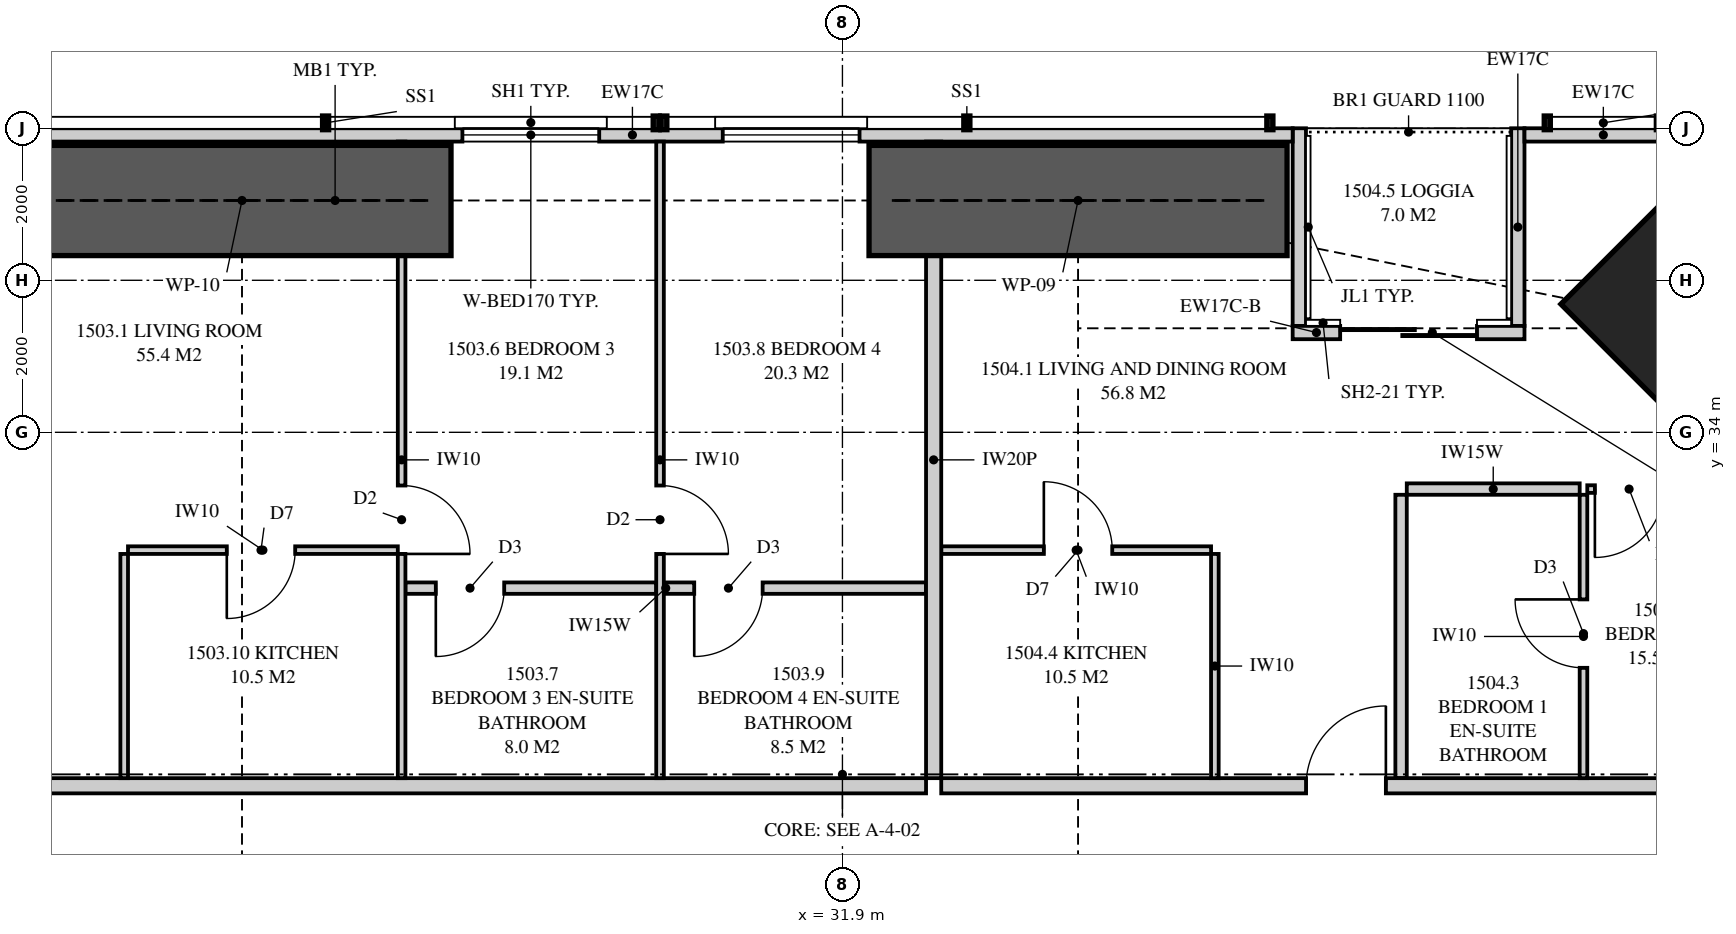
"""IFC4 building model, lengths in metres.
Left out: names, types, materials, properties, quantities, classifications, styles, units other than length and angle.
Written with IfcOpenShell. Run it as: python <this file> out.ifc"""

import sys

from ifc_helpers import new_model, si_unit, direction, frame, frame_2d, origin, origin_2d, place, context, subcontext, project, spatial, polyline, rectangle, outline, extrude, element, fill, save


model = new_model("IFC4")
c1 = context("Model", 3, precision=1e-05, world=origin(), true_north=direction((0.0, 1.0)))
c2 = subcontext(c1, "Body", "Model", "MODEL_VIEW")
j1 = project(units=[si_unit("LENGTHUNIT", "METRE"), si_unit("PLANEANGLEUNIT", "RADIAN")], contexts=[c1])
p1 = place(None, origin())
s1 = spatial("IfcSite", under=j1, at=p1, CompositionType="ELEMENT")
p2 = place(p1, origin())
s2 = spatial("IfcBuilding", under=s1, at=p2, CompositionType="ELEMENT")
p3 = place(p2, frame((0.0, 0.0, 57.85)))
s3 = spatial("IfcBuildingStorey", under=s2, at=p3, CompositionType="ELEMENT", Elevation=57.85)
p4 = place(p3, frame((43.369, 35.369, 0.0), z_axis=(0.0, 0.0, 1.0), x_axis=(-0.707106781187, -0.707106781187, 0.0)))
e1 = element("IfcColumn", 1, at=p4, inside=s3, PredefinedType="COLUMN", context=c2, shape_type="SweptSolid", body=[
    extrude(rectangle(XDim=2.4, YDim=3.3, at=origin_2d()), origin(), (0.0, 0.0, 1.0), 3.35),
])
p5 = place(p3, frame((42.949, 37.913, 0.0), z_axis=(0.0, 0.0, 1.0), x_axis=(-1.0, 0.0, 0.0)))
e2 = element("IfcWall", 2, at=p5, inside=s3, PredefinedType="SOLIDWALL", context=c2, shape_type="SweptSolid", body=[
    extrude(rectangle(XDim=2.075, YDim=0.175, at=frame_2d((1.038, 0.0))), origin(), (0.0, 0.0, 1.0), 3.11),
])
p6 = place(p3, frame((37.824, 37.913, 0.0), z_axis=(0.0, 0.0, 1.0), x_axis=(-1.0, 0.0, 0.0)))
e3 = element("IfcWall", 3, at=p6, inside=s3, PredefinedType="SOLIDWALL", context=c2, shape_type="SweptSolid", body=[
    extrude(outline(polyline([(0.0, 0.0), (17.374, 0.0), (17.374, 2.15), (2.824, 2.15), (2.824, 3.11), (2.668, 3.11), (2.668, 2.15), (2.62, 2.15), (2.62, 3.11), (0.0, 3.11), (0.0, 0.0)])), frame((0.0, 0.087, 0.0), z_axis=(0.0, -1.0, 0.0), x_axis=(1.0, 0.0, 0.0)), (0.0, 0.0, 1.0), 0.175),
])
p7 = place(p6, frame((5.699, 0.0, 0.4)))
e4 = element("IfcOpeningElement", 4, at=p7, cuts=e3, PredefinedType="OPENING", context=c2, shape_type="SweptSolid", body=[
    extrude(rectangle(XDim=1.8, YDim=1.7, at=frame_2d((0.9, 0.85))), frame((0.0, 0.097, 0.0), z_axis=(0.0, -1.0, 0.0), x_axis=(1.0, 0.0, 0.0)), (0.0, 0.0, 1.0), 0.195),
])
p8 = place(p6, frame((9.124, 0.0, 0.4)))
e5 = element("IfcOpeningElement", 5, at=p8, cuts=e3, PredefinedType="OPENING", context=c2, shape_type="SweptSolid", body=[
    extrude(rectangle(XDim=1.8, YDim=1.7, at=frame_2d((0.9, 0.85))), frame((0.0, 0.097, 0.0), z_axis=(0.0, -1.0, 0.0), x_axis=(1.0, 0.0, 0.0)), (0.0, 0.0, 1.0), 0.195),
])
p9 = place(p3, frame((40.874, 35.312, 0.0), z_axis=(0.0, 0.0, 1.0), x_axis=(-1.0, 0.0, 0.0)))
e6 = element("IfcWall", 6, at=p9, inside=s3, PredefinedType="SOLIDWALL", context=c2, shape_type="SweptSolid", body=[
    extrude(rectangle(XDim=2.425, YDim=0.175, at=frame_2d((1.212, 0.0))), origin(), (0.0, 0.0, 1.0), 2.15),
])
p10 = place(p9, frame((0.625, 0.0, 0.0)))
e7 = element("IfcOpeningElement", 7, at=p10, cuts=e6, PredefinedType="OPENING", context=c2, shape_type="SweptSolid", body=[
    extrude(rectangle(XDim=1.8, YDim=2.1, at=frame_2d((0.9, 1.05))), frame((0.0, 0.097, 0.0), z_axis=(0.0, -1.0, 0.0), x_axis=(1.0, 0.0, 0.0)), (0.0, 0.0, 1.0), 0.195),
])
p11 = place(p3, frame((38.449, 35.312, 0.0), z_axis=(0.0, 0.0, 1.0), x_axis=(-1.0, 0.0, 0.0)))
e8 = element("IfcWall", 8, at=p11, inside=s3, PredefinedType="SOLIDWALL", context=c2, shape_type="SweptSolid", body=[
    extrude(rectangle(XDim=0.625, YDim=0.175, at=frame_2d((0.312, 0.0))), origin(), (0.0, 0.0, 1.0), 2.51),
])
p12 = place(p3, frame((40.786, 38.0, 0.0), z_axis=(0.0, 0.0, 1.0), x_axis=(0.0, -1.0, 0.0)))
e9 = element("IfcWall", 9, at=p12, inside=s3, PredefinedType="SOLIDWALL", context=c2, shape_type="SweptSolid", body=[
    extrude(outline(polyline([(0.0, 0.0), (2.6, 0.0), (2.6, 2.15), (1.279, 2.15), (1.279, 3.11), (0.0, 3.11), (0.0, 0.0)])), frame((0.0, 0.087, 0.0), z_axis=(0.0, -1.0, 0.0), x_axis=(1.0, 0.0, 0.0)), (0.0, 0.0, 1.0), 0.175),
])
p13 = place(p3, frame((37.911, 38.0, 0.0), z_axis=(0.0, 0.0, 1.0), x_axis=(0.0, -1.0, 0.0)))
e10 = element("IfcWall", 10, at=p13, inside=s3, PredefinedType="SOLIDWALL", context=c2, shape_type="SweptSolid", body=[
    extrude(outline(polyline([(0.0, 0.0), (2.6, 0.0), (2.6, 2.51), (2.368, 2.51), (2.368, 2.15), (0.701, 2.15), (0.701, 3.11), (0.0, 3.11), (0.0, 0.0)])), frame((0.0, 0.087, 0.0), z_axis=(0.0, -1.0, 0.0), x_axis=(1.0, 0.0, 0.0)), (0.0, 0.0, 1.0), 0.175),
])
p14 = place(p3, frame((33.1, 37.825, 0.0), z_axis=(0.0, 0.0, 1.0), x_axis=(0.0, -1.0, 0.0)))
e11 = element("IfcWall", 11, at=p14, inside=s3, PredefinedType="PARTITIONING", context=c2, shape_type="SweptSolid", body=[
    extrude(outline(polyline([(0.529, 2.15), (0.0, 2.15), (0.0, 0.0), (0.529, 0.0), (0.529, 0.205), (1.021, 0.205), (1.021, 0.0), (8.375, 0.0), (8.375, 3.11), (1.685, 3.11), (1.685, 2.15), (1.021, 2.15), (1.021, 1.945), (0.529, 1.945), (0.529, 2.15)])), frame((0.0, 0.1, 0.0), z_axis=(0.0, -1.0, 0.0), x_axis=(1.0, 0.0, 0.0)), (0.0, 0.0, 1.0), 0.2),
])
p15 = place(p3, frame((17.725, 29.35, 0.0), z_axis=(0.0, 0.0, 1.0), x_axis=(1.0, 0.0, 0.0)))
e12 = element("IfcWall", 12, at=p15, inside=s3, PredefinedType="PARTITIONING", context=c2, shape_type="SweptSolid", body=[
    extrude(outline(polyline([(0.0, 0.0), (15.275, 0.0), (15.275, 3.11), (6.612, 3.11), (6.612, 2.541), (5.938, 2.541), (5.938, 3.11), (0.0, 3.11), (0.0, 0.0)])), frame((0.0, 0.1, 0.0), z_axis=(0.0, -1.0, 0.0), x_axis=(1.0, 0.0, 0.0)), (0.0, 0.0, 1.0), 0.2),
])
p16 = place(p15, frame((0.2, 0.0, 0.0)))
e13 = element("IfcOpeningElement", 13, at=p16, cuts=e12, PredefinedType="OPENING", context=c2, shape_type="SweptSolid", body=[
    extrude(rectangle(XDim=1.05, YDim=2.2, at=frame_2d((0.525, 1.1))), frame((0.0, 0.11, 0.0), z_axis=(0.0, -1.0, 0.0), x_axis=(1.0, 0.0, 0.0)), (0.0, 0.0, 1.0), 0.22),
])
p17 = place(p3, frame((26.1, 37.825, 0.0), z_axis=(0.0, 0.0, 1.0), x_axis=(0.0, -1.0, 0.0)))
e14 = element("IfcWall", 14, at=p17, inside=s3, PredefinedType="PARTITIONING", context=c2, shape_type="SweptSolid", body=[
    extrude(outline(polyline([(0.529, 2.15), (0.0, 2.15), (0.0, 0.0), (0.529, 0.0), (0.529, 0.034), (1.021, 0.034), (1.021, 0.0), (8.375, 0.0), (8.375, 3.11), (1.635, 3.11), (1.635, 2.15), (1.021, 2.15), (1.021, 2.116), (0.529, 2.116), (0.529, 2.15)])), frame((0.0, 0.05, 0.0), z_axis=(0.0, -1.0, 0.0), x_axis=(1.0, 0.0, 0.0)), (0.0, 0.0, 1.0), 0.1),
])
p18 = place(p17, frame((4.525, 0.0, 0.0)))
e15 = element("IfcOpeningElement", 15, at=p18, cuts=e14, PredefinedType="OPENING", context=c2, shape_type="SweptSolid", body=[
    extrude(rectangle(XDim=0.9, YDim=2.1, at=frame_2d((0.45, 1.05))), frame((0.0, 0.06, 0.0), z_axis=(0.0, -1.0, 0.0), x_axis=(1.0, 0.0, 0.0)), (0.0, 0.0, 1.0), 0.12),
])
p19 = place(p3, frame((29.5, 37.825, 0.0), z_axis=(0.0, 0.0, 1.0), x_axis=(0.0, -1.0, 0.0)))
e16 = element("IfcWall", 16, at=p19, inside=s3, PredefinedType="PARTITIONING", context=c2, shape_type="SweptSolid", body=[
    extrude(outline(polyline([(0.0, 0.0), (8.375, 0.0), (8.375, 3.11), (1.635, 3.11), (1.635, 2.15), (0.0, 2.15), (0.0, 3.11), (0.0, 0.0)])), frame((0.0, 0.05, 0.0), z_axis=(0.0, -1.0, 0.0), x_axis=(1.0, 0.0, 0.0)), (0.0, 0.0, 1.0), 0.1),
])
p20 = place(p19, frame((4.525, 0.0, 0.0)))
e17 = element("IfcOpeningElement", 17, at=p20, cuts=e16, PredefinedType="OPENING", context=c2, shape_type="SweptSolid", body=[
    extrude(rectangle(XDim=0.9, YDim=2.1, at=frame_2d((0.45, 1.05))), frame((0.0, 0.06, 0.0), z_axis=(0.0, -1.0, 0.0), x_axis=(1.0, 0.0, 0.0)), (0.0, 0.0, 1.0), 0.12),
])
p21 = place(p3, frame((26.15, 31.95, 0.0), z_axis=(0.0, 0.0, 1.0), x_axis=(1.0, 0.0, 0.0)))
e18 = element("IfcWall", 18, at=p21, inside=s3, PredefinedType="PLUMBINGWALL", context=c2, shape_type="SweptSolid", body=[
    extrude(rectangle(XDim=3.3, YDim=0.15, at=frame_2d((1.65, 0.0))), origin(), (0.0, 0.0, 1.0), 3.11),
])
p22 = place(p21, frame((0.4, 0.0, 0.0)))
e19 = element("IfcOpeningElement", 19, at=p22, cuts=e18, PredefinedType="OPENING", context=c2, shape_type="SweptSolid", body=[
    extrude(rectangle(XDim=0.9, YDim=2.1, at=frame_2d((0.45, 1.05))), frame((0.0, 0.085, 0.0), z_axis=(0.0, -1.0, 0.0), x_axis=(1.0, 0.0, 0.0)), (0.0, 0.0, 1.0), 0.17),
])
p23 = place(p3, frame((29.55, 31.95, 0.0), z_axis=(0.0, 0.0, 1.0), x_axis=(1.0, 0.0, 0.0)))
e20 = element("IfcWall", 20, at=p23, inside=s3, PredefinedType="PLUMBINGWALL", context=c2, shape_type="SweptSolid", body=[
    extrude(rectangle(XDim=3.45, YDim=0.15, at=frame_2d((1.725, 0.0))), origin(), (0.0, 0.0, 1.0), 3.11),
])
p24 = place(p23, frame((0.4, 0.0, 0.0)))
e21 = element("IfcOpeningElement", 21, at=p24, cuts=e20, PredefinedType="OPENING", context=c2, shape_type="SweptSolid", body=[
    extrude(rectangle(XDim=0.9, YDim=2.1, at=frame_2d((0.45, 1.05))), frame((0.0, 0.085, 0.0), z_axis=(0.0, -1.0, 0.0), x_axis=(1.0, 0.0, 0.0)), (0.0, 0.0, 1.0), 0.17),
])
p25 = place(p3, frame((22.5, 32.45, 0.0), z_axis=(0.0, 0.0, 1.0), x_axis=(1.0, 0.0, 0.0)))
e22 = element("IfcWall", 22, at=p25, inside=s3, PredefinedType="PARTITIONING", context=c2, shape_type="SweptSolid", body=[
    extrude(outline(polyline([(0.0, 0.0), (3.55, 0.0), (3.55, 3.11), (1.787, 3.11), (1.787, 2.541), (1.213, 2.541), (1.213, 3.11), (0.0, 3.11), (0.0, 0.0)])), frame((0.0, 0.05, 0.0), z_axis=(0.0, -1.0, 0.0), x_axis=(1.0, 0.0, 0.0)), (0.0, 0.0, 1.0), 0.1),
])
p26 = place(p25, frame((1.3, 0.0, 0.0)))
e23 = element("IfcOpeningElement", 23, at=p26, cuts=e22, PredefinedType="OPENING", context=c2, shape_type="SweptSolid", body=[
    extrude(rectangle(XDim=0.9, YDim=2.1, at=frame_2d((0.45, 1.05))), frame((0.0, 0.06, 0.0), z_axis=(0.0, -1.0, 0.0), x_axis=(1.0, 0.0, 0.0)), (0.0, 0.0, 1.0), 0.12),
])
p27 = place(p3, frame((22.45, 32.4, 0.0), z_axis=(0.0, 0.0, 1.0), x_axis=(0.0, -1.0, 0.0)))
e24 = element("IfcWall", 24, at=p27, inside=s3, PredefinedType="PARTITIONING", context=c2, shape_type="SweptSolid", body=[
    extrude(rectangle(XDim=2.95, YDim=0.1, at=frame_2d((1.475, 0.0))), origin(), (0.0, 0.0, 1.0), 3.11),
])
p28 = place(p3, frame((33.2, 29.35, 0.0), z_axis=(0.0, 0.0, 1.0), x_axis=(1.0, 0.0, 0.0)))
e25 = element("IfcWall", 25, at=p28, inside=s3, PredefinedType="PARTITIONING", context=c2, shape_type="SweptSolid", body=[
    extrude(outline(polyline([(0.0, 0.0), (12.8, 0.0), (12.8, 3.11), (12.066, 3.11), (12.066, 2.15), (10.223, 2.15), (10.223, 3.11), (2.137, 3.11), (2.137, 2.541), (1.463, 2.541), (1.463, 3.11), (0.0, 3.11), (0.0, 0.0)])), frame((0.0, 0.1, 0.0), z_axis=(0.0, -1.0, 0.0), x_axis=(1.0, 0.0, 0.0)), (0.0, 0.0, 1.0), 0.2),
])
p29 = place(p28, frame((4.8, 0.0, 0.0)))
e26 = element("IfcOpeningElement", 26, at=p29, cuts=e25, PredefinedType="OPENING", context=c2, shape_type="SweptSolid", body=[
    extrude(rectangle(XDim=1.05, YDim=2.2, at=frame_2d((0.525, 1.1))), frame((0.0, 0.11, 0.0), z_axis=(0.0, -1.0, 0.0), x_axis=(1.0, 0.0, 0.0)), (0.0, 0.0, 1.0), 0.22),
])
p30 = place(p3, frame((41.65, 33.178, 0.0), z_axis=(0.0, 0.0, 1.0), x_axis=(0.0, -1.0, 0.0)))
e27 = element("IfcWall", 27, at=p30, inside=s3, PredefinedType="PARTITIONING", context=c2, shape_type="SweptSolid", body=[
    extrude(rectangle(XDim=3.728, YDim=0.1, at=frame_2d((1.864, 0.0))), origin(), (0.0, 0.0, 1.0), 3.11),
])
p31 = place(p30, frame((1.377, 0.0, 0.0)))
e28 = element("IfcOpeningElement", 28, at=p31, cuts=e27, PredefinedType="OPENING", context=c2, shape_type="SweptSolid", body=[
    extrude(rectangle(XDim=0.9, YDim=2.1, at=frame_2d((0.45, 1.05))), frame((0.0, 0.06, 0.0), z_axis=(0.0, -1.0, 0.0), x_axis=(1.0, 0.0, 0.0)), (0.0, 0.0, 1.0), 0.12),
])
p32 = place(p3, frame((41.7, 33.253, 0.0), z_axis=(0.0, 0.0, 1.0), x_axis=(1.0, 0.0, 0.0)))
e29 = element("IfcWall", 29, at=p32, inside=s3, PredefinedType="PARTITIONING", context=c2, shape_type="SweptSolid", body=[
    extrude(outline(polyline([(0.0, 0.0), (4.3, 0.0), (4.3, 3.11), (2.883, 3.11), (2.883, 2.15), (1.14, 2.15), (1.14, 3.11), (0.0, 3.11), (0.0, 0.0)])), frame((0.0, 0.05, 0.0), z_axis=(0.0, -1.0, 0.0), x_axis=(1.0, 0.0, 0.0)), (0.0, 0.0, 1.0), 0.1),
])
p33 = place(p32, frame((0.1, 0.0, 0.0)))
e30 = element("IfcOpeningElement", 30, at=p33, cuts=e29, PredefinedType="OPENING", context=c2, shape_type="SweptSolid", body=[
    extrude(rectangle(XDim=0.9, YDim=2.1, at=frame_2d((0.45, 1.05))), frame((0.0, 0.06, 0.0), z_axis=(0.0, -1.0, 0.0), x_axis=(1.0, 0.0, 0.0)), (0.0, 0.0, 1.0), 0.12),
])
p34 = place(p3, frame((39.325, 33.253, 0.0), z_axis=(0.0, 0.0, 1.0), x_axis=(1.0, 0.0, 0.0)))
e31 = element("IfcWall", 31, at=p34, inside=s3, PredefinedType="PLUMBINGWALL", context=c2, shape_type="SweptSolid", body=[
    extrude(rectangle(XDim=2.275, YDim=0.15, at=frame_2d((1.138, 0.0))), origin(), (0.0, 0.0, 1.0), 3.11),
])
p35 = place(p3, frame((39.25, 33.178, 0.0), z_axis=(0.0, 0.0, 1.0), x_axis=(0.0, -1.0, 0.0)))
e32 = element("IfcWall", 32, at=p35, inside=s3, PredefinedType="PLUMBINGWALL", context=c2, shape_type="SweptSolid", body=[
    extrude(rectangle(XDim=3.728, YDim=0.15, at=frame_2d((1.864, 0.0))), origin(), (0.0, 0.0, 1.0), 3.11),
])
p36 = place(p3, frame((33.2, 32.45, 0.0), z_axis=(0.0, 0.0, 1.0), x_axis=(1.0, 0.0, 0.0)))
e33 = element("IfcWall", 33, at=p36, inside=s3, PredefinedType="PARTITIONING", context=c2, shape_type="SweptSolid", body=[
    extrude(outline(polyline([(0.0, 0.0), (3.55, 0.0), (3.55, 3.11), (2.087, 3.11), (2.087, 2.541), (1.513, 2.541), (1.513, 3.11), (0.0, 3.11), (0.0, 0.0)])), frame((0.0, 0.05, 0.0), z_axis=(0.0, -1.0, 0.0), x_axis=(1.0, 0.0, 0.0)), (0.0, 0.0, 1.0), 0.1),
])
p37 = place(p36, frame((1.35, 0.0, 0.0)))
e34 = element("IfcOpeningElement", 34, at=p37, cuts=e33, PredefinedType="OPENING", context=c2, shape_type="SweptSolid", body=[
    extrude(rectangle(XDim=0.9, YDim=2.1, at=frame_2d((0.45, 1.05))), frame((0.0, 0.06, 0.0), z_axis=(0.0, -1.0, 0.0), x_axis=(1.0, 0.0, 0.0)), (0.0, 0.0, 1.0), 0.12),
])
p38 = place(p3, frame((36.8, 32.4, 0.0), z_axis=(0.0, 0.0, 1.0), x_axis=(0.0, -1.0, 0.0)))
e35 = element("IfcWall", 35, at=p38, inside=s3, PredefinedType="PARTITIONING", context=c2, shape_type="SweptSolid", body=[
    extrude(rectangle(XDim=2.95, YDim=0.1, at=frame_2d((1.475, 0.0))), origin(), (0.0, 0.0, 1.0), 3.11),
])
for number, where, z_axis, x_axis in (
    (36, (32.25, 37.05, 0.0), (0.0, 0.0, 1.0), (1.0, 0.0, 0.0)),
    (37, (21.25, 37.05, 0.0), (0.0, 0.0, 1.0), (1.0, 0.0, 0.0)),
):
    element("IfcWall", number, at=place(p3, frame(where, z_axis=z_axis, x_axis=x_axis)), inside=s3, PredefinedType="SHEAR", context=c2, shape_type="SweptSolid", body=[
        extrude(rectangle(XDim=5.5, YDim=1.45, at=frame_2d((2.75, 0.0))), origin(), (0.0, 0.0, 1.0), 3.35),
    ])
p39 = place(p10, origin())
e38 = element("IfcDoor", 38, at=p39, inside=s3, OperationType="SLIDING_TO_LEFT", PredefinedType="DOOR", context=c2, shape_type="SweptSolid", body=[
    extrude(rectangle(XDim=1.8, YDim=2.1, at=frame_2d((0.9, 1.05))), frame((0.0, 0.025, 0.0), z_axis=(0.0, -1.0, 0.0), x_axis=(1.0, 0.0, 0.0)), (0.0, 0.0, 1.0), 0.05),
])
fill(e7, e38)
p40 = place(p7, origin())
e39 = element("IfcWindow", 39, at=p40, inside=s3, PartitioningType="SINGLE_PANEL", PredefinedType="WINDOW", context=c2, shape_type="SweptSolid", body=[
    extrude(rectangle(XDim=1.8, YDim=1.7, at=frame_2d((0.9, 0.85))), frame((0.0, 0.03, 0.0), z_axis=(0.0, -1.0, 0.0), x_axis=(1.0, 0.0, 0.0)), (0.0, 0.0, 1.0), 0.06),
])
fill(e4, e39)
p41 = place(p8, origin())
e40 = element("IfcWindow", 40, at=p41, inside=s3, PartitioningType="SINGLE_PANEL", PredefinedType="WINDOW", context=c2, shape_type="SweptSolid", body=[
    extrude(rectangle(XDim=1.8, YDim=1.7, at=frame_2d((0.9, 0.85))), frame((0.0, 0.03, 0.0), z_axis=(0.0, -1.0, 0.0), x_axis=(1.0, 0.0, 0.0)), (0.0, 0.0, 1.0), 0.06),
])
fill(e5, e40)
p42 = place(p18, origin())
e41 = element("IfcDoor", 41, at=p42, inside=s3, OperationType="SINGLE_SWING_RIGHT", PredefinedType="DOOR", context=c2, shape_type="SweptSolid", body=[
    extrude(rectangle(XDim=0.9, YDim=2.1, at=frame_2d((0.45, 1.05))), frame((0.0, 0.025, 0.0), z_axis=(0.0, -1.0, 0.0), x_axis=(1.0, 0.0, 0.0)), (0.0, 0.0, 1.0), 0.05),
])
fill(e15, e41)
p43 = place(p22, frame((0.9, 0.0, 0.0), z_axis=(0.0, 0.0, 1.0), x_axis=(-1.0, 0.0, 0.0)))
e42 = element("IfcDoor", 42, at=p43, inside=s3, OperationType="SINGLE_SWING_RIGHT", PredefinedType="DOOR", context=c2, shape_type="SweptSolid", body=[
    extrude(rectangle(XDim=0.9, YDim=2.1, at=frame_2d((0.45, 1.05))), frame((0.0, 0.025, 0.0), z_axis=(0.0, -1.0, 0.0), x_axis=(1.0, 0.0, 0.0)), (0.0, 0.0, 1.0), 0.05),
])
fill(e19, e42)
p44 = place(p20, origin())
e43 = element("IfcDoor", 43, at=p44, inside=s3, OperationType="SINGLE_SWING_RIGHT", PredefinedType="DOOR", context=c2, shape_type="SweptSolid", body=[
    extrude(rectangle(XDim=0.9, YDim=2.1, at=frame_2d((0.45, 1.05))), frame((0.0, 0.025, 0.0), z_axis=(0.0, -1.0, 0.0), x_axis=(1.0, 0.0, 0.0)), (0.0, 0.0, 1.0), 0.05),
])
fill(e17, e43)
p45 = place(p24, frame((0.9, 0.0, 0.0), z_axis=(0.0, 0.0, 1.0), x_axis=(-1.0, 0.0, 0.0)))
e44 = element("IfcDoor", 44, at=p45, inside=s3, OperationType="SINGLE_SWING_RIGHT", PredefinedType="DOOR", context=c2, shape_type="SweptSolid", body=[
    extrude(rectangle(XDim=0.9, YDim=2.1, at=frame_2d((0.45, 1.05))), frame((0.0, 0.025, 0.0), z_axis=(0.0, -1.0, 0.0), x_axis=(1.0, 0.0, 0.0)), (0.0, 0.0, 1.0), 0.05),
])
fill(e21, e44)
p46 = place(p26, frame((0.9, 0.0, 0.0), z_axis=(0.0, 0.0, 1.0), x_axis=(-1.0, 0.0, 0.0)))
e45 = element("IfcDoor", 45, at=p46, inside=s3, OperationType="SINGLE_SWING_RIGHT", PredefinedType="DOOR", context=c2, shape_type="SweptSolid", body=[
    extrude(rectangle(XDim=0.9, YDim=2.1, at=frame_2d((0.45, 1.05))), frame((0.0, 0.025, 0.0), z_axis=(0.0, -1.0, 0.0), x_axis=(1.0, 0.0, 0.0)), (0.0, 0.0, 1.0), 0.05),
])
fill(e23, e45)
p47 = place(p29, origin())
e46 = element("IfcDoor", 46, at=p47, inside=s3, OperationType="SINGLE_SWING_RIGHT", PredefinedType="DOOR", context=c2, shape_type="SweptSolid", body=[
    extrude(rectangle(XDim=1.05, YDim=2.2, at=frame_2d((0.525, 1.1))), frame((0.0, 0.025, 0.0), z_axis=(0.0, -1.0, 0.0), x_axis=(1.0, 0.0, 0.0)), (0.0, 0.0, 1.0), 0.05),
])
fill(e26, e46)
p48 = place(p33, frame((0.9, 0.0, 0.0), z_axis=(0.0, 0.0, 1.0), x_axis=(-1.0, 0.0, 0.0)))
e47 = element("IfcDoor", 47, at=p48, inside=s3, OperationType="SINGLE_SWING_RIGHT", PredefinedType="DOOR", context=c2, shape_type="SweptSolid", body=[
    extrude(rectangle(XDim=0.9, YDim=2.1, at=frame_2d((0.45, 1.05))), frame((0.0, 0.025, 0.0), z_axis=(0.0, -1.0, 0.0), x_axis=(1.0, 0.0, 0.0)), (0.0, 0.0, 1.0), 0.05),
])
fill(e30, e47)
p49 = place(p31, frame((0.9, 0.0, 0.0), z_axis=(0.0, 0.0, 1.0), x_axis=(-1.0, 0.0, 0.0)))
e48 = element("IfcDoor", 48, at=p49, inside=s3, OperationType="SINGLE_SWING_RIGHT", PredefinedType="DOOR", context=c2, shape_type="SweptSolid", body=[
    extrude(rectangle(XDim=0.9, YDim=2.1, at=frame_2d((0.45, 1.05))), frame((0.0, 0.025, 0.0), z_axis=(0.0, -1.0, 0.0), x_axis=(1.0, 0.0, 0.0)), (0.0, 0.0, 1.0), 0.05),
])
fill(e28, e48)
p50 = place(p37, origin())
e49 = element("IfcDoor", 49, at=p50, inside=s3, OperationType="SINGLE_SWING_LEFT", PredefinedType="DOOR", context=c2, shape_type="SweptSolid", body=[
    extrude(rectangle(XDim=0.9, YDim=2.1, at=frame_2d((0.45, 1.05))), frame((0.0, 0.025, 0.0), z_axis=(0.0, -1.0, 0.0), x_axis=(1.0, 0.0, 0.0)), (0.0, 0.0, 1.0), 0.05),
])
fill(e34, e49)
save(model, sys.argv[1])
